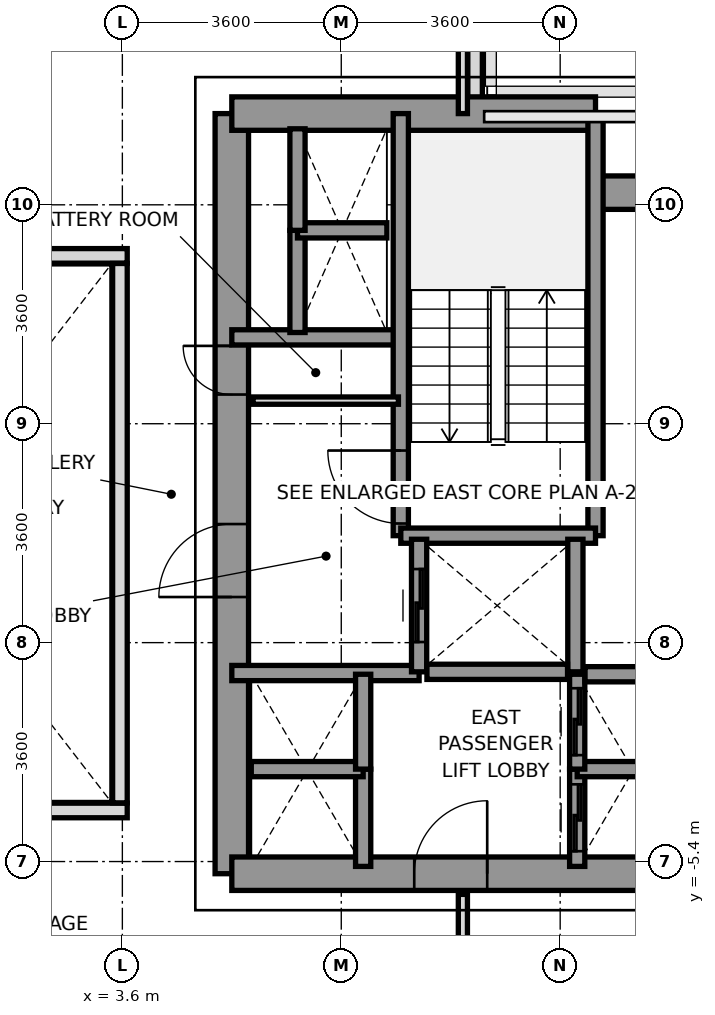
"""IFC4 building model, lengths in metres.
Left out: names, types, materials, properties, quantities, classifications, styles, units other than length and angle.
Written with IfcOpenShell. Run it as: python <this file> out.ifc"""

import sys

from ifc_helpers import new_model, si_unit, direction, frame, frame_2d, origin, place, context, subcontext, project, spatial, rectangle, extrude, source, transform, mapped, element, fill, save


model = new_model("IFC4")
c1 = context("Model", 3, precision=1e-05, world=origin(), true_north=direction((0.0, 1.0)))
c2 = subcontext(c1, "Body", "Model", "MODEL_VIEW")
j1 = project(units=[si_unit("LENGTHUNIT", "METRE"), si_unit("PLANEANGLEUNIT", "RADIAN")], contexts=[c1])
p1 = place(None, origin())
s1 = spatial("IfcSite", under=j1, at=p1, CompositionType="ELEMENT")
p2 = place(p1, origin())
s2 = spatial("IfcBuilding", under=s1, at=p2, CompositionType="ELEMENT")
p3 = place(p2, frame((0.0, 0.0, 68.0)))
s3 = spatial("IfcBuildingStorey", under=s2, at=p3, CompositionType="ELEMENT", Elevation=68.0)
p4 = place(p3, frame((9.4, 8.397, 0.0), z_axis=(0.0, 0.0, 1.0), x_axis=(0.0, -1.0, 0.0)))
e1 = element("IfcWall", 1, at=p4, inside=s3, PredefinedType="PARAPET", context=c2, shape_type="SweptSolid", body=[
    extrude(rectangle(XDim=1.444, YDim=0.24, at=frame_2d((0.722, 0.0))), origin(), (0.0, 0.0, 1.0), 1.15),
])
p5 = place(p3, frame((5.4, -5.6, 0.0), z_axis=(0.0, 0.0, 1.0), x_axis=(0.0, 1.0, 0.0)))
e2 = element("IfcWall", 2, at=p5, inside=s3, PredefinedType="SHEAR", context=c2, shape_type="SweptSolid", body=[
    extrude(rectangle(XDim=12.5, YDim=0.55, at=frame_2d((6.25, 0.0))), origin(), (0.0, 0.0, 1.0), 3.2),
])
p6 = place(p5, frame((4.55, 0.0, 0.0)))
e3 = element("IfcOpeningElement", 3, at=p6, cuts=e2, PredefinedType="OPENING", context=c2, shape_type="SweptSolid", body=[
    extrude(rectangle(XDim=1.2, YDim=2.2, at=frame_2d((0.6, 1.1))), frame((0.0, 0.285, 0.0), z_axis=(0.0, -1.0, 0.0), x_axis=(1.0, 0.0, 0.0)), (0.0, 0.0, 1.0), 0.57),
])
p7 = place(p5, frame((7.88, 0.0, 0.0)))
e4 = element("IfcOpeningElement", 4, at=p7, cuts=e2, PredefinedType="OPENING", context=c2, shape_type="SweptSolid", body=[
    extrude(rectangle(XDim=0.8, YDim=2.1, at=frame_2d((0.4, 1.05))), frame((0.0, 0.285, 0.0), z_axis=(0.0, -1.0, 0.0), x_axis=(1.0, 0.0, 0.0)), (0.0, 0.0, 1.0), 0.57),
])
p8 = place(p3, frame((5.4, 6.9, 0.0), z_axis=(0.0, 0.0, 1.0), x_axis=(1.0, 0.0, 0.0)))
e5 = element("IfcWall", 5, at=p8, inside=s3, PredefinedType="SHEAR", context=c2, shape_type="SweptSolid", body=[
    extrude(rectangle(XDim=5.981, YDim=0.55, at=frame_2d((2.991, 0.0))), origin(), (0.0, 0.0, 1.0), 3.2),
])
p9 = place(p3, frame((11.381, 5.6, 0.0), z_axis=(0.0, 0.0, 1.0), x_axis=(1.0, 0.0, 0.0)))
e6 = element("IfcWall", 6, at=p9, inside=s3, PredefinedType="SHEAR", context=c2, shape_type="SweptSolid", body=[
    extrude(rectangle(XDim=1.819, YDim=0.55, at=frame_2d((0.909, 0.0))), origin(), (0.0, 0.0, 1.0), 3.2),
])
p10 = place(p3, frame((5.4, -5.6, 0.0), z_axis=(0.0, 0.0, 1.0), x_axis=(1.0, 0.0, 0.0)))
e7 = element("IfcWall", 7, at=p10, inside=s3, PredefinedType="SHEAR", context=c2, shape_type="SweptSolid", body=[
    extrude(rectangle(XDim=7.8, YDim=0.55, at=frame_2d((3.9, 0.0))), origin(), (0.0, 0.0, 1.0), 3.2),
])
p11 = place(p10, frame((3.0, 0.0, 0.0)))
e8 = element("IfcOpeningElement", 8, at=p11, cuts=e7, PredefinedType="OPENING", context=c2, shape_type="SweptSolid", body=[
    extrude(rectangle(XDim=1.2, YDim=2.2, at=frame_2d((0.6, 1.1))), frame((0.0, 0.285, 0.0), z_axis=(0.0, -1.0, 0.0), x_axis=(1.0, 0.0, 0.0)), (0.0, 0.0, 1.0), 0.57),
])
p12 = place(p3, frame((5.4, 3.22, 0.0), z_axis=(0.0, 0.0, 1.0), x_axis=(1.0, 0.0, 0.0)))
e9 = element("IfcWall", 9, at=p12, inside=s3, PredefinedType="SOLIDWALL", context=c2, shape_type="SweptSolid", body=[
    extrude(rectangle(XDim=2.78, YDim=0.25, at=frame_2d((1.39, 0.0))), origin(), (0.0, 0.0, 1.0), 3.2),
])
p13 = place(p3, frame((5.4, -2.3, 0.0), z_axis=(0.0, 0.0, 1.0), x_axis=(1.0, 0.0, 0.0)))
e10 = element("IfcWall", 10, at=p13, inside=s3, PredefinedType="SOLIDWALL", context=c2, shape_type="SweptSolid", body=[
    extrude(rectangle(XDim=3.08, YDim=0.25, at=frame_2d((1.54, 0.0))), origin(), (0.0, 0.0, 1.0), 3.2),
])
p14 = place(p3, frame((8.179, -0.041, 0.0), z_axis=(0.0, 0.0, 1.0), x_axis=(0.0, 1.0, 0.0)))
e11 = element("IfcWall", 11, at=p14, inside=s3, PredefinedType="SOLIDWALL", context=c2, shape_type="SweptSolid", body=[
    extrude(rectangle(XDim=6.941, YDim=0.25, at=frame_2d((3.47, 0.0))), origin(), (0.0, 0.0, 1.0), 3.2),
])
p15 = place(p14, frame((0.2, 0.0, 0.0)))
e12 = element("IfcOpeningElement", 12, at=p15, cuts=e11, PredefinedType="OPENING", context=c2, shape_type="SweptSolid", body=[
    extrude(rectangle(XDim=1.2, YDim=2.2, at=frame_2d((0.6, 1.1))), frame((0.0, 0.135, 0.0), z_axis=(0.0, -1.0, 0.0), x_axis=(1.0, 0.0, 0.0)), (0.0, 0.0, 1.0), 0.27),
])
p16 = place(p3, frame((11.381, -0.041, 0.0), z_axis=(0.0, 0.0, 1.0), x_axis=(0.0, 1.0, 0.0)))
e13 = element("IfcWall", 13, at=p16, inside=s3, PredefinedType="SOLIDWALL", context=c2, shape_type="SweptSolid", body=[
    extrude(rectangle(XDim=6.941, YDim=0.25, at=frame_2d((3.47, 0.0))), origin(), (0.0, 0.0, 1.0), 3.2),
])
p17 = place(p3, frame((8.179, -0.041, 0.0), z_axis=(0.0, 0.0, 1.0), x_axis=(1.0, 0.0, 0.0)))
e14 = element("IfcWall", 14, at=p17, inside=s3, PredefinedType="SOLIDWALL", context=c2, shape_type="SweptSolid", body=[
    extrude(rectangle(XDim=3.202, YDim=0.25, at=frame_2d((1.601, 0.0))), origin(), (0.0, 0.0, 1.0), 3.2),
])
p18 = place(p3, frame((8.48, -2.28, 0.0), z_axis=(0.0, 0.0, 1.0), x_axis=(0.0, 1.0, 0.0)))
e15 = element("IfcWall", 15, at=p18, inside=s3, PredefinedType="SOLIDWALL", context=c2, shape_type="SweptSolid", body=[
    extrude(rectangle(XDim=2.18, YDim=0.25, at=frame_2d((1.09, 0.0))), origin(), (0.0, 0.0, 1.0), 3.2),
])
p19 = place(p18, frame((0.49, 0.0, 0.0)))
e16 = element("IfcOpeningElement", 16, at=p19, cuts=e15, PredefinedType="OPENING", context=c2, shape_type="SweptSolid", body=[
    extrude(rectangle(XDim=1.2, YDim=2.2, at=frame_2d((0.6, 1.1))), frame((0.0, 0.135, 0.0), z_axis=(0.0, -1.0, 0.0), x_axis=(1.0, 0.0, 0.0)), (0.0, 0.0, 1.0), 0.27),
])
p20 = place(p3, frame((11.05, -2.28, 0.0), z_axis=(0.0, 0.0, 1.0), x_axis=(0.0, 1.0, 0.0)))
e17 = element("IfcWall", 17, at=p20, inside=s3, PredefinedType="SOLIDWALL", context=c2, shape_type="SweptSolid", body=[
    extrude(rectangle(XDim=2.18, YDim=0.25, at=frame_2d((1.09, 0.0))), origin(), (0.0, 0.0, 1.0), 3.2),
])
p21 = place(p3, frame((8.609, -2.28, 0.0), z_axis=(0.0, 0.0, 1.0), x_axis=(1.0, 0.0, 0.0)))
e18 = element("IfcWall", 18, at=p21, inside=s3, PredefinedType="SOLIDWALL", context=c2, shape_type="SweptSolid", body=[
    extrude(rectangle(XDim=2.312, YDim=0.25, at=frame_2d((1.156, 0.0))), origin(), (0.0, 0.0, 1.0), 3.2),
])
p22 = place(p3, frame((11.08, -5.48, 0.0), z_axis=(0.0, 0.0, 1.0), x_axis=(0.0, 1.0, 0.0)))
e19 = element("IfcWall", 19, at=p22, inside=s3, PredefinedType="SOLIDWALL", context=c2, shape_type="SweptSolid", body=[
    extrude(rectangle(XDim=1.6, YDim=0.25, at=frame_2d((0.8, 0.0))), origin(), (0.0, 0.0, 1.0), 3.2),
])
p23 = place(p22, frame((0.25, 0.0, 0.0)))
e20 = element("IfcOpeningElement", 20, at=p23, cuts=e19, PredefinedType="OPENING", context=c2, shape_type="SweptSolid", body=[
    extrude(rectangle(XDim=1.1, YDim=2.2, at=frame_2d((0.55, 1.1))), frame((0.0, 0.135, 0.0), z_axis=(0.0, -1.0, 0.0), x_axis=(1.0, 0.0, 0.0)), (0.0, 0.0, 1.0), 0.27),
])
p24 = place(p3, frame((11.08, -3.88, 0.0), z_axis=(0.0, 0.0, 1.0), x_axis=(1.0, 0.0, 0.0)))
e21 = element("IfcWall", 21, at=p24, inside=s3, PredefinedType="SOLIDWALL", context=c2, shape_type="SweptSolid", body=[
    extrude(rectangle(XDim=1.84, YDim=0.25, at=frame_2d((0.92, 0.0))), origin(), (0.0, 0.0, 1.0), 3.2),
])
p25 = place(p3, frame((11.08, -3.88, 0.0), z_axis=(0.0, 0.0, 1.0), x_axis=(0.0, 1.0, 0.0)))
e22 = element("IfcWall", 22, at=p25, inside=s3, PredefinedType="SOLIDWALL", context=c2, shape_type="SweptSolid", body=[
    extrude(rectangle(XDim=1.56, YDim=0.25, at=frame_2d((0.78, 0.0))), origin(), (0.0, 0.0, 1.0), 3.2),
])
p26 = place(p25, frame((0.23, 0.0, 0.0)))
e23 = element("IfcOpeningElement", 23, at=p26, cuts=e22, PredefinedType="OPENING", context=c2, shape_type="SweptSolid", body=[
    extrude(rectangle(XDim=1.1, YDim=2.2, at=frame_2d((0.55, 1.1))), frame((0.0, 0.135, 0.0), z_axis=(0.0, -1.0, 0.0), x_axis=(1.0, 0.0, 0.0)), (0.0, 0.0, 1.0), 0.27),
])
p27 = place(p3, frame((11.209, -2.32, 0.0), z_axis=(0.0, 0.0, 1.0), x_axis=(1.0, 0.0, 0.0)))
e24 = element("IfcWall", 24, at=p27, inside=s3, PredefinedType="SOLIDWALL", context=c2, shape_type="SweptSolid", body=[
    extrude(rectangle(XDim=1.582, YDim=0.25, at=frame_2d((0.791, 0.0))), origin(), (0.0, 0.0, 1.0), 3.2),
])
p28 = place(p3, frame((7.56, -5.48, 0.0), z_axis=(0.0, 0.0, 1.0), x_axis=(0.0, 1.0, 0.0)))
e25 = element("IfcWall", 25, at=p28, inside=s3, PredefinedType="SOLIDWALL", context=c2, shape_type="SweptSolid", body=[
    extrude(rectangle(XDim=1.6, YDim=0.25, at=frame_2d((0.8, 0.0))), origin(), (0.0, 0.0, 1.0), 3.2),
])
p29 = place(p3, frame((5.72, -3.88, 0.0), z_axis=(0.0, 0.0, 1.0), x_axis=(1.0, 0.0, 0.0)))
e26 = element("IfcWall", 26, at=p29, inside=s3, PredefinedType="SOLIDWALL", context=c2, shape_type="SweptSolid", body=[
    extrude(rectangle(XDim=1.84, YDim=0.25, at=frame_2d((0.92, 0.0))), origin(), (0.0, 0.0, 1.0), 3.2),
])
p30 = place(p3, frame((7.56, -3.88, 0.0), z_axis=(0.0, 0.0, 1.0), x_axis=(0.0, 1.0, 0.0)))
e27 = element("IfcWall", 27, at=p30, inside=s3, PredefinedType="SOLIDWALL", context=c2, shape_type="SweptSolid", body=[
    extrude(rectangle(XDim=1.56, YDim=0.25, at=frame_2d((0.78, 0.0))), origin(), (0.0, 0.0, 1.0), 3.2),
])
p31 = place(p3, frame((6.48, 3.3, 0.0), z_axis=(0.0, 0.0, 1.0), x_axis=(0.0, 1.0, 0.0)))
e28 = element("IfcWall", 28, at=p31, inside=s3, PredefinedType="SOLIDWALL", context=c2, shape_type="SweptSolid", body=[
    extrude(rectangle(XDim=1.68, YDim=0.25, at=frame_2d((0.84, 0.0))), origin(), (0.0, 0.0, 1.0), 3.2),
])
p32 = place(p3, frame((6.48, 4.98, 0.0), z_axis=(0.0, 0.0, 1.0), x_axis=(1.0, 0.0, 0.0)))
e29 = element("IfcWall", 29, at=p32, inside=s3, PredefinedType="SOLIDWALL", context=c2, shape_type="SweptSolid", body=[
    extrude(rectangle(XDim=1.47, YDim=0.25, at=frame_2d((0.735, 0.0))), origin(), (0.0, 0.0, 1.0), 3.2),
])
p33 = place(p3, frame((6.48, 4.98, 0.0), z_axis=(0.0, 0.0, 1.0), x_axis=(0.0, 1.0, 0.0)))
e30 = element("IfcWall", 30, at=p33, inside=s3, PredefinedType="SOLIDWALL", context=c2, shape_type="SweptSolid", body=[
    extrude(rectangle(XDim=1.67, YDim=0.25, at=frame_2d((0.835, 0.0))), origin(), (0.0, 0.0, 1.0), 3.2),
])
p34 = place(p3, frame((5.75, 2.18, 0.0), z_axis=(0.0, 0.0, 1.0), x_axis=(1.0, 0.0, 0.0)))
e31 = element("IfcWall", 31, at=p34, inside=s3, PredefinedType="PARTITIONING", context=c2, shape_type="SweptSolid", body=[
    extrude(rectangle(XDim=2.39, YDim=0.12, at=frame_2d((1.195, 0.0))), origin(), (0.0, 0.0, 1.0), 2.3),
])
p35 = place(p3, frame((9.2, 6.9, 0.0), z_axis=(0.0, 0.0, 1.0), x_axis=(0.0, 1.0, 0.0)))
e32 = element("IfcWall", 32, at=p35, inside=s3, PredefinedType="PARTITIONING", context=c2, shape_type="SweptSolid", body=[
    extrude(rectangle(XDim=8.78, YDim=0.15, at=frame_2d((4.39, 0.0))), origin(), (0.0, 0.0, 1.0), 2.71),
])
p36 = place(p3, frame((9.2, -15.68, 0.0), z_axis=(0.0, 0.0, 1.0), x_axis=(0.0, 1.0, 0.0)))
e33 = element("IfcWall", 33, at=p36, inside=s3, PredefinedType="PARTITIONING", context=c2, shape_type="SweptSolid", body=[
    extrude(rectangle(XDim=9.74, YDim=0.15, at=frame_2d((4.87, 0.0))), origin(), (0.0, 0.0, 1.0), 2.71),
])
for number, where, z_axis, x_axis in (
    (34, (-3.68, -4.56, 0.0), (0.0, 0.0, 1.0), (1.0, 0.0, 0.0)),
    (35, (-3.68, 4.56, 0.0), (0.0, 0.0, 1.0), (1.0, 0.0, 0.0)),
):
    element("IfcWall", number, at=place(p3, frame(where, z_axis=z_axis, x_axis=x_axis)), inside=s3, PredefinedType="PARAPET", context=c2, shape_type="SweptSolid", body=[
        extrude(rectangle(XDim=7.36, YDim=0.24, at=frame_2d((3.68, 0.0))), origin(), (0.0, 0.0, 1.0), 1.15),
    ])
p37 = place(p3, frame((3.56, -4.435, 0.0), z_axis=(0.0, 0.0, 1.0), x_axis=(0.0, 1.0, 0.0)))
e36 = element("IfcWall", 36, at=p37, inside=s3, PredefinedType="PARAPET", context=c2, shape_type="SweptSolid", body=[
    extrude(rectangle(XDim=8.87, YDim=0.24, at=frame_2d((4.435, 0.0))), origin(), (0.0, 0.0, 1.0), 1.15),
])
m1 = source(origin(), c2, "Body", "SweptSolid", [
    extrude(rectangle(XDim=1.2, YDim=2.2, at=frame_2d((0.6, 1.1))), frame((0.0, 0.025, 0.0), z_axis=(0.0, -1.0, 0.0), x_axis=(1.0, 0.0, 0.0)), (0.0, 0.0, 1.0), 0.05),
])
p38 = place(p15, origin())
e37 = element("IfcDoor", 37, at=p38, inside=s3, OperationType="SINGLE_SWING_RIGHT", PredefinedType="DOOR", context=c2, shape_type="MappedRepresentation", body=[
    mapped(m1, transform((0.0, 0.0, 0.0), x_axis=(1.0, 0.0, 0.0), y_axis=(0.0, 1.0, 0.0), z_axis=(0.0, 0.0, 1.0), scale=1.0)),
])
fill(e12, e37)
p39 = place(p6, origin())
e38 = element("IfcDoor", 38, at=p39, inside=s3, OperationType="SINGLE_SWING_LEFT", PredefinedType="DOOR", context=c2, shape_type="MappedRepresentation", body=[
    mapped(m1, transform((0.0, 0.0, 0.0), x_axis=(1.0, 0.0, 0.0), y_axis=(0.0, 1.0, 0.0), z_axis=(0.0, 0.0, 1.0), scale=1.0)),
])
fill(e3, e38)
p40 = place(p11, origin())
e39 = element("IfcDoor", 39, at=p40, inside=s3, OperationType="SINGLE_SWING_RIGHT", PredefinedType="DOOR", context=c2, shape_type="MappedRepresentation", body=[
    mapped(m1, transform((0.0, 0.0, 0.0), x_axis=(1.0, 0.0, 0.0), y_axis=(0.0, 1.0, 0.0), z_axis=(0.0, 0.0, 1.0), scale=1.0)),
])
fill(e8, e39)
m2 = source(origin(), c2, "Body", "SweptSolid", [
    extrude(rectangle(XDim=0.8, YDim=2.1, at=frame_2d((0.4, 1.05))), frame((0.0, 0.025, 0.0), z_axis=(0.0, -1.0, 0.0), x_axis=(1.0, 0.0, 0.0)), (0.0, 0.0, 1.0), 0.05),
])
p41 = place(p7, origin())
e40 = element("IfcDoor", 40, at=p41, inside=s3, OperationType="SINGLE_SWING_RIGHT", PredefinedType="DOOR", context=c2, shape_type="MappedRepresentation", body=[
    mapped(m2, transform((0.0, 0.0, 0.0), x_axis=(1.0, 0.0, 0.0), y_axis=(0.0, 1.0, 0.0), z_axis=(0.0, 0.0, 1.0), scale=1.0)),
])
fill(e4, e40)
p42 = place(p19, origin())
e41 = element("IfcDoor", 41, at=p42, inside=s3, OperationType="SLIDING_TO_RIGHT", PredefinedType="DOOR", context=c2, shape_type="MappedRepresentation", body=[
    mapped(m1, transform((0.0, 0.0, 0.0), x_axis=(1.0, 0.0, 0.0), y_axis=(0.0, 1.0, 0.0), z_axis=(0.0, 0.0, 1.0), scale=1.0)),
])
fill(e16, e41)
m3 = source(origin(), c2, "Body", "SweptSolid", [
    extrude(rectangle(XDim=1.1, YDim=2.2, at=frame_2d((0.55, 1.1))), frame((0.0, 0.025, 0.0), z_axis=(0.0, -1.0, 0.0), x_axis=(1.0, 0.0, 0.0)), (0.0, 0.0, 1.0), 0.05),
])
p43 = place(p23, origin())
e42 = element("IfcDoor", 42, at=p43, inside=s3, OperationType="SLIDING_TO_LEFT", PredefinedType="DOOR", context=c2, shape_type="MappedRepresentation", body=[
    mapped(m3, transform((0.0, 0.0, 0.0), x_axis=(1.0, 0.0, 0.0), y_axis=(0.0, 1.0, 0.0), z_axis=(0.0, 0.0, 1.0), scale=1.0)),
])
fill(e20, e42)
p44 = place(p26, origin())
e43 = element("IfcDoor", 43, at=p44, inside=s3, OperationType="SLIDING_TO_LEFT", PredefinedType="DOOR", context=c2, shape_type="MappedRepresentation", body=[
    mapped(m3, transform((0.0, 0.0, 0.0), x_axis=(1.0, 0.0, 0.0), y_axis=(0.0, 1.0, 0.0), z_axis=(0.0, 0.0, 1.0), scale=1.0)),
])
fill(e23, e43)
save(model, sys.argv[1])
